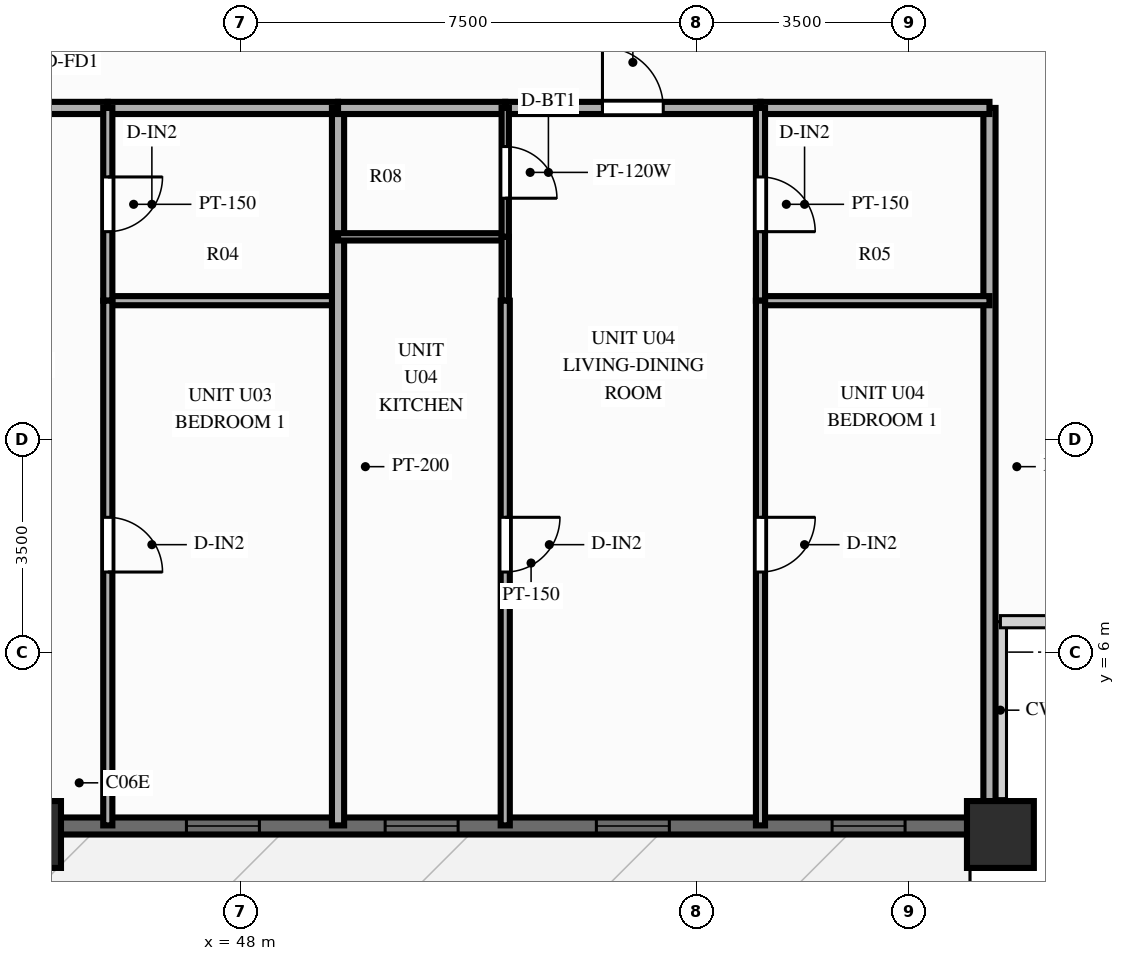
"""IFC4 building model, lengths in metres.
Left out: names, types, materials, properties, quantities, classifications, styles, units other than length and angle.
Written with IfcOpenShell. Run it as: python <this file> out.ifc"""

import sys

from ifc_helpers import new_model, si_unit, direction, frame, frame_2d, origin, origin_2d, place, context, subcontext, project, spatial, rectangle, extrude, source, transform, mapped, element, fill, save


model = new_model("IFC4")
c1 = context("Model", 3, precision=1e-05, world=origin(), true_north=direction((0.0, 1.0)))
c2 = subcontext(c1, "Body", "Model", "MODEL_VIEW")
j1 = project(units=[si_unit("LENGTHUNIT", "METRE"), si_unit("PLANEANGLEUNIT", "RADIAN")], contexts=[c1])
p1 = place(None, origin())
s1 = spatial("IfcSite", under=j1, at=p1, CompositionType="ELEMENT")
p2 = place(p1, origin())
s2 = spatial("IfcBuilding", under=s1, at=p2, CompositionType="ELEMENT")
p3 = place(p2, frame((0.0, 0.0, 34.4)))
s3 = spatial("IfcBuildingStorey", under=s2, at=p3, CompositionType="ELEMENT", Elevation=34.4)
m1 = source(origin(), c2, "Body", "SweptSolid", [
    extrude(rectangle(XDim=1.1, YDim=1.1, at=origin_2d()), origin(), (0.0, 0.0, 1.0), 3.0),
])
for number, where, z_axis, x_axis in (
    (1, (44.5, 3.0, 0.0), (0.0, 0.0, 1.0), (1.0, 0.0, 0.0)),
    (2, (60.5, 3.0, 0.0), (0.0, 0.0, 1.0), (1.0, 0.0, 0.0)),
):
    element("IfcColumn", number, at=place(p3, frame(where, z_axis=z_axis, x_axis=x_axis)), inside=s3, PredefinedType="COLUMN", context=c2, shape_type="MappedRepresentation", body=[
        mapped(m1, transform((0.0, 0.0, 0.0), scale=1.0)),
    ])
p4 = place(p3, frame((15.5, 3.14, 0.0), z_axis=(0.0, 0.0, 1.0), x_axis=(1.0, 0.0, 0.0)))
e3 = element("IfcWall", 3, at=p4, inside=s3, PredefinedType="SOLIDWALL", context=c2, shape_type="SweptSolid", body=[
    extrude(rectangle(XDim=45.0, YDim=0.28, at=frame_2d((22.5, 0.0))), origin(), (0.0, 0.0, 1.0), 2.28),
])
p5 = place(p4, frame((1.06, 0.0, 0.25)))
e4 = element("IfcOpeningElement", 4, at=p5, cuts=e3, PredefinedType="OPENING", context=c2, shape_type="SweptSolid", body=[
    extrude(rectangle(XDim=1.2, YDim=1.5, at=frame_2d((0.6, 0.75))), frame((0.0, 0.152, 0.0), z_axis=(0.0, -1.0, 0.0), x_axis=(1.0, 0.0, 0.0)), (0.0, 0.0, 1.0), 0.304),
])
p6 = place(p4, frame((4.875, 0.0, 0.25)))
e5 = element("IfcOpeningElement", 5, at=p6, cuts=e3, PredefinedType="OPENING", context=c2, shape_type="SweptSolid", body=[
    extrude(rectangle(XDim=1.2, YDim=1.5, at=frame_2d((0.6, 0.75))), frame((0.0, 0.152, 0.0), z_axis=(0.0, -1.0, 0.0), x_axis=(1.0, 0.0, 0.0)), (0.0, 0.0, 1.0), 0.304),
])
p7 = place(p4, frame((9.303, 0.0, 0.25)))
e6 = element("IfcOpeningElement", 6, at=p7, cuts=e3, PredefinedType="OPENING", context=c2, shape_type="SweptSolid", body=[
    extrude(rectangle(XDim=1.2, YDim=1.5, at=frame_2d((0.6, 0.75))), frame((0.0, 0.152, 0.0), z_axis=(0.0, -1.0, 0.0), x_axis=(1.0, 0.0, 0.0)), (0.0, 0.0, 1.0), 0.304),
])
p8 = place(p4, frame((13.098, 0.0, 0.25)))
e7 = element("IfcOpeningElement", 7, at=p8, cuts=e3, PredefinedType="OPENING", context=c2, shape_type="SweptSolid", body=[
    extrude(rectangle(XDim=1.2, YDim=1.5, at=frame_2d((0.6, 0.75))), frame((0.0, 0.152, 0.0), z_axis=(0.0, -1.0, 0.0), x_axis=(1.0, 0.0, 0.0)), (0.0, 0.0, 1.0), 0.304),
])
p9 = place(p4, frame((17.408, 0.0, 0.25)))
e8 = element("IfcOpeningElement", 8, at=p9, cuts=e3, PredefinedType="OPENING", context=c2, shape_type="SweptSolid", body=[
    extrude(rectangle(XDim=1.2, YDim=1.5, at=frame_2d((0.6, 0.75))), frame((0.0, 0.152, 0.0), z_axis=(0.0, -1.0, 0.0), x_axis=(1.0, 0.0, 0.0)), (0.0, 0.0, 1.0), 0.304),
])
p10 = place(p4, frame((22.06, 0.0, 0.0), z_axis=(0.0, 0.0, 1.0), x_axis=(-1.0, 0.0, 0.0)))
e9 = element("IfcOpeningElement", 9, at=p10, cuts=e3, PredefinedType="OPENING", context=c2, shape_type="SweptSolid", body=[
    extrude(rectangle(XDim=1.1, YDim=2.15, at=frame_2d((0.55, 1.075))), frame((0.0, 0.152, 0.0), z_axis=(0.0, -1.0, 0.0), x_axis=(1.0, 0.0, 0.0)), (0.0, 0.0, 1.0), 0.304),
])
p11 = place(p4, frame((24.168, 0.0, 0.25)))
e10 = element("IfcOpeningElement", 10, at=p11, cuts=e3, PredefinedType="OPENING", context=c2, shape_type="SweptSolid", body=[
    extrude(rectangle(XDim=1.2, YDim=1.5, at=frame_2d((0.6, 0.75))), frame((0.0, 0.152, 0.0), z_axis=(0.0, -1.0, 0.0), x_axis=(1.0, 0.0, 0.0)), (0.0, 0.0, 1.0), 0.304),
])
p12 = place(p4, frame((26.776, 0.0, 0.25)))
e11 = element("IfcOpeningElement", 11, at=p12, cuts=e3, PredefinedType="OPENING", context=c2, shape_type="SweptSolid", body=[
    extrude(rectangle(XDim=1.2, YDim=1.5, at=frame_2d((0.6, 0.75))), frame((0.0, 0.152, 0.0), z_axis=(0.0, -1.0, 0.0), x_axis=(1.0, 0.0, 0.0)), (0.0, 0.0, 1.0), 0.304),
])
p13 = place(p4, frame((31.613, 0.0, 0.25)))
e12 = element("IfcOpeningElement", 12, at=p13, cuts=e3, PredefinedType="OPENING", context=c2, shape_type="SweptSolid", body=[
    extrude(rectangle(XDim=1.2, YDim=1.5, at=frame_2d((0.6, 0.75))), frame((0.0, 0.152, 0.0), z_axis=(0.0, -1.0, 0.0), x_axis=(1.0, 0.0, 0.0)), (0.0, 0.0, 1.0), 0.304),
])
p14 = place(p4, frame((34.881, 0.0, 0.25)))
e13 = element("IfcOpeningElement", 13, at=p14, cuts=e3, PredefinedType="OPENING", context=c2, shape_type="SweptSolid", body=[
    extrude(rectangle(XDim=1.2, YDim=1.5, at=frame_2d((0.6, 0.75))), frame((0.0, 0.152, 0.0), z_axis=(0.0, -1.0, 0.0), x_axis=(1.0, 0.0, 0.0)), (0.0, 0.0, 1.0), 0.304),
])
p15 = place(p4, frame((38.355, 0.0, 0.25)))
e14 = element("IfcOpeningElement", 14, at=p15, cuts=e3, PredefinedType="OPENING", context=c2, shape_type="SweptSolid", body=[
    extrude(rectangle(XDim=1.2, YDim=1.5, at=frame_2d((0.6, 0.75))), frame((0.0, 0.152, 0.0), z_axis=(0.0, -1.0, 0.0), x_axis=(1.0, 0.0, 0.0)), (0.0, 0.0, 1.0), 0.304),
])
p16 = place(p4, frame((42.232, 0.0, 0.25)))
e15 = element("IfcOpeningElement", 15, at=p16, cuts=e3, PredefinedType="OPENING", context=c2, shape_type="SweptSolid", body=[
    extrude(rectangle(XDim=1.2, YDim=1.5, at=frame_2d((0.6, 0.75))), frame((0.0, 0.152, 0.0), z_axis=(0.0, -1.0, 0.0), x_axis=(1.0, 0.0, 0.0)), (0.0, 0.0, 1.0), 0.304),
])
p17 = place(p3, frame((60.32, 14.95, 0.0), z_axis=(0.0, 0.0, 1.0), x_axis=(0.0, -1.0, 0.0)))
e16 = element("IfcWall", 16, at=p17, inside=s3, PredefinedType="PARTITIONING", context=c2, shape_type="SweptSolid", body=[
    extrude(rectangle(XDim=11.8, YDim=0.2, at=frame_2d((5.9, 0.0))), origin(), (0.0, 0.0, 1.0), 2.79),
])
p18 = place(p3, frame((41.643, 14.95, 0.0), z_axis=(0.0, 0.0, 1.0), x_axis=(1.0, 0.0, 0.0)))
e17 = element("IfcWall", 17, at=p18, inside=s3, PredefinedType="PARTITIONING", context=c2, shape_type="SweptSolid", body=[
    extrude(rectangle(XDim=4.177, YDim=0.2, at=frame_2d((2.089, 0.0))), origin(), (0.0, 0.0, 1.0), 2.79),
])
p19 = place(p18, frame((1.589, 0.0, 0.0)))
e18 = element("IfcOpeningElement", 18, at=p19, cuts=e17, PredefinedType="OPENING", context=c2, shape_type="SweptSolid", body=[
    extrude(rectangle(XDim=1.0, YDim=2.15, at=frame_2d((0.5, 1.075))), frame((0.0, 0.112, 0.0), z_axis=(0.0, -1.0, 0.0), x_axis=(1.0, 0.0, 0.0)), (0.0, 0.0, 1.0), 0.224),
])
p20 = place(p3, frame((45.82, 14.95, 0.0), z_axis=(0.0, 0.0, 1.0), x_axis=(1.0, 0.0, 0.0)))
e19 = element("IfcWall", 19, at=p20, inside=s3, PredefinedType="PARTITIONING", context=c2, shape_type="SweptSolid", body=[
    extrude(rectangle(XDim=3.786, YDim=0.2, at=frame_2d((1.893, 0.0))), origin(), (0.0, 0.0, 1.0), 2.79),
])
p21 = place(p3, frame((45.82, 11.78, 0.0), z_axis=(0.0, 0.0, 1.0), x_axis=(1.0, 0.0, 0.0)))
e20 = element("IfcWall", 20, at=p21, inside=s3, PredefinedType="PARTITIONING", context=c2, shape_type="SweptSolid", body=[
    extrude(rectangle(XDim=3.786, YDim=0.15, at=frame_2d((1.893, 0.0))), origin(), (0.0, 0.0, 1.0), 2.79),
])
p22 = place(p3, frame((45.82, 14.95, 0.0), z_axis=(0.0, 0.0, 1.0), x_axis=(0.0, -1.0, 0.0)))
e21 = element("IfcWall", 21, at=p22, inside=s3, PredefinedType="PARTITIONING", context=c2, shape_type="SweptSolid", body=[
    extrude(rectangle(XDim=3.17, YDim=0.15, at=frame_2d((1.585, 0.0))), origin(), (0.0, 0.0, 1.0), 2.79),
])
p23 = place(p22, frame((1.135, 0.0, 0.0)))
e22 = element("IfcOpeningElement", 22, at=p23, cuts=e21, PredefinedType="OPENING", context=c2, shape_type="SweptSolid", body=[
    extrude(rectangle(XDim=0.9, YDim=2.1, at=frame_2d((0.45, 1.05))), frame((0.0, 0.087, 0.0), z_axis=(0.0, -1.0, 0.0), x_axis=(1.0, 0.0, 0.0)), (0.0, 0.0, 1.0), 0.174),
])
p24 = place(p3, frame((45.82, 11.78, 0.0), z_axis=(0.0, 0.0, 1.0), x_axis=(0.0, -1.0, 0.0)))
e23 = element("IfcWall", 23, at=p24, inside=s3, PredefinedType="PARTITIONING", context=c2, shape_type="SweptSolid", body=[
    extrude(rectangle(XDim=8.63, YDim=0.15, at=frame_2d((4.315, 0.0))), origin(), (0.0, 0.0, 1.0), 2.79),
])
p25 = place(p24, frame((3.563, 0.0, 0.0)))
e24 = element("IfcOpeningElement", 24, at=p25, cuts=e23, PredefinedType="OPENING", context=c2, shape_type="SweptSolid", body=[
    extrude(rectangle(XDim=0.9, YDim=2.1, at=frame_2d((0.45, 1.05))), frame((0.0, 0.087, 0.0), z_axis=(0.0, -1.0, 0.0), x_axis=(1.0, 0.0, 0.0)), (0.0, 0.0, 1.0), 0.174),
])
p26 = place(p3, frame((49.606, 14.95, 0.0), z_axis=(0.0, 0.0, 1.0), x_axis=(0.0, -1.0, 0.0)))
e25 = element("IfcWall", 25, at=p26, inside=s3, PredefinedType="PARTITIONING", context=c2, shape_type="SweptSolid", body=[
    extrude(rectangle(XDim=11.8, YDim=0.2, at=frame_2d((5.9, 0.0))), origin(), (0.0, 0.0, 1.0), 2.79),
])
p27 = place(p3, frame((49.606, 14.95, 0.0), z_axis=(0.0, 0.0, 1.0), x_axis=(1.0, 0.0, 0.0)))
e26 = element("IfcWall", 26, at=p27, inside=s3, PredefinedType="PARTITIONING", context=c2, shape_type="SweptSolid", body=[
    extrude(rectangle(XDim=2.75, YDim=0.2, at=frame_2d((1.375, 0.0))), origin(), (0.0, 0.0, 1.0), 2.79),
])
p28 = place(p3, frame((52.356, 14.95, 0.0), z_axis=(0.0, 0.0, 1.0), x_axis=(1.0, 0.0, 0.0)))
e27 = element("IfcWall", 27, at=p28, inside=s3, PredefinedType="PARTITIONING", context=c2, shape_type="SweptSolid", body=[
    extrude(rectangle(XDim=4.198, YDim=0.2, at=frame_2d((2.099, 0.0))), origin(), (0.0, 0.0, 1.0), 2.79),
])
p29 = place(p28, frame((1.599, 0.0, 0.0)))
e28 = element("IfcOpeningElement", 28, at=p29, cuts=e27, PredefinedType="OPENING", context=c2, shape_type="SweptSolid", body=[
    extrude(rectangle(XDim=1.0, YDim=2.15, at=frame_2d((0.5, 1.075))), frame((0.0, 0.112, 0.0), z_axis=(0.0, -1.0, 0.0), x_axis=(1.0, 0.0, 0.0)), (0.0, 0.0, 1.0), 0.224),
])
p30 = place(p3, frame((56.554, 14.95, 0.0), z_axis=(0.0, 0.0, 1.0), x_axis=(1.0, 0.0, 0.0)))
e29 = element("IfcWall", 29, at=p30, inside=s3, PredefinedType="PARTITIONING", context=c2, shape_type="SweptSolid", body=[
    extrude(rectangle(XDim=3.766, YDim=0.2, at=frame_2d((1.883, 0.0))), origin(), (0.0, 0.0, 1.0), 2.79),
])
p31 = place(p3, frame((49.606, 12.83, 0.0), z_axis=(0.0, 0.0, 1.0), x_axis=(1.0, 0.0, 0.0)))
e30 = element("IfcWall", 30, at=p31, inside=s3, PredefinedType="PARTITIONING", context=c2, shape_type="SweptSolid", body=[
    extrude(rectangle(XDim=2.75, YDim=0.12, at=frame_2d((1.375, 0.0))), origin(), (0.0, 0.0, 1.0), 2.79),
])
p32 = place(p3, frame((56.554, 11.78, 0.0), z_axis=(0.0, 0.0, 1.0), x_axis=(1.0, 0.0, 0.0)))
e31 = element("IfcWall", 31, at=p32, inside=s3, PredefinedType="PARTITIONING", context=c2, shape_type="SweptSolid", body=[
    extrude(rectangle(XDim=3.766, YDim=0.15, at=frame_2d((1.883, 0.0))), origin(), (0.0, 0.0, 1.0), 2.79),
])
p33 = place(p3, frame((52.356, 14.95, 0.0), z_axis=(0.0, 0.0, 1.0), x_axis=(0.0, -1.0, 0.0)))
e32 = element("IfcWall", 32, at=p33, inside=s3, PredefinedType="PARTITIONING", context=c2, shape_type="SweptSolid", body=[
    extrude(rectangle(XDim=2.12, YDim=0.12, at=frame_2d((1.06, 0.0))), origin(), (0.0, 0.0, 1.0), 2.79),
])
p34 = place(p33, frame((0.635, 0.0, 0.0)))
e33 = element("IfcOpeningElement", 33, at=p34, cuts=e32, PredefinedType="OPENING", context=c2, shape_type="SweptSolid", body=[
    extrude(rectangle(XDim=0.85, YDim=2.05, at=frame_2d((0.425, 1.025))), frame((0.0, 0.072, 0.0), z_axis=(0.0, -1.0, 0.0), x_axis=(1.0, 0.0, 0.0)), (0.0, 0.0, 1.0), 0.144),
])
p35 = place(p3, frame((52.356, 12.83, 0.0), z_axis=(0.0, 0.0, 1.0), x_axis=(0.0, -1.0, 0.0)))
e34 = element("IfcWall", 34, at=p35, inside=s3, PredefinedType="PARTITIONING", context=c2, shape_type="SweptSolid", body=[
    extrude(rectangle(XDim=1.05, YDim=0.12, at=frame_2d((0.525, 0.0))), origin(), (0.0, 0.0, 1.0), 2.79),
])
p36 = place(p3, frame((52.356, 11.78, 0.0), z_axis=(0.0, 0.0, 1.0), x_axis=(0.0, -1.0, 0.0)))
e35 = element("IfcWall", 35, at=p36, inside=s3, PredefinedType="PARTITIONING", context=c2, shape_type="SweptSolid", body=[
    extrude(rectangle(XDim=8.63, YDim=0.15, at=frame_2d((4.315, 0.0))), origin(), (0.0, 0.0, 1.0), 2.79),
])
p37 = place(p36, frame((3.563, 0.0, 0.0)))
e36 = element("IfcOpeningElement", 36, at=p37, cuts=e35, PredefinedType="OPENING", context=c2, shape_type="SweptSolid", body=[
    extrude(rectangle(XDim=0.9, YDim=2.1, at=frame_2d((0.45, 1.05))), frame((0.0, 0.087, 0.0), z_axis=(0.0, -1.0, 0.0), x_axis=(1.0, 0.0, 0.0)), (0.0, 0.0, 1.0), 0.174),
])
p38 = place(p3, frame((56.554, 14.95, 0.0), z_axis=(0.0, 0.0, 1.0), x_axis=(0.0, -1.0, 0.0)))
e37 = element("IfcWall", 37, at=p38, inside=s3, PredefinedType="PARTITIONING", context=c2, shape_type="SweptSolid", body=[
    extrude(rectangle(XDim=3.17, YDim=0.15, at=frame_2d((1.585, 0.0))), origin(), (0.0, 0.0, 1.0), 2.79),
])
p39 = place(p38, frame((1.135, 0.0, 0.0)))
e38 = element("IfcOpeningElement", 38, at=p39, cuts=e37, PredefinedType="OPENING", context=c2, shape_type="SweptSolid", body=[
    extrude(rectangle(XDim=0.9, YDim=2.1, at=frame_2d((0.45, 1.05))), frame((0.0, 0.087, 0.0), z_axis=(0.0, -1.0, 0.0), x_axis=(1.0, 0.0, 0.0)), (0.0, 0.0, 1.0), 0.174),
])
p40 = place(p3, frame((56.554, 11.78, 0.0), z_axis=(0.0, 0.0, 1.0), x_axis=(0.0, -1.0, 0.0)))
e39 = element("IfcWall", 39, at=p40, inside=s3, PredefinedType="PARTITIONING", context=c2, shape_type="SweptSolid", body=[
    extrude(rectangle(XDim=8.63, YDim=0.15, at=frame_2d((4.315, 0.0))), origin(), (0.0, 0.0, 1.0), 2.79),
])
p41 = place(p40, frame((3.563, 0.0, 0.0)))
e40 = element("IfcOpeningElement", 40, at=p41, cuts=e39, PredefinedType="OPENING", context=c2, shape_type="SweptSolid", body=[
    extrude(rectangle(XDim=0.9, YDim=2.1, at=frame_2d((0.45, 1.05))), frame((0.0, 0.087, 0.0), z_axis=(0.0, -1.0, 0.0), x_axis=(1.0, 0.0, 0.0)), (0.0, 0.0, 1.0), 0.174),
])
m2 = source(origin(), c2, "Body", "SweptSolid", [
    extrude(rectangle(XDim=1.2, YDim=1.5, at=frame_2d((0.6, 0.75))), frame((0.0, 0.03, 0.0), z_axis=(0.0, -1.0, 0.0), x_axis=(1.0, 0.0, 0.0)), (0.0, 0.0, 1.0), 0.06),
])
p42 = place(p13, origin())
e41 = element("IfcWindow", 41, at=p42, inside=s3, PartitioningType="SINGLE_PANEL", PredefinedType="WINDOW", context=c2, shape_type="MappedRepresentation", body=[
    mapped(m2, transform((0.0, 0.0, 0.0), scale=1.0)),
])
fill(e12, e41)
p43 = place(p14, origin())
e42 = element("IfcWindow", 42, at=p43, inside=s3, PartitioningType="SINGLE_PANEL", PredefinedType="WINDOW", context=c2, shape_type="MappedRepresentation", body=[
    mapped(m2, transform((0.0, 0.0, 0.0), scale=1.0)),
])
fill(e13, e42)
p44 = place(p15, origin())
e43 = element("IfcWindow", 43, at=p44, inside=s3, PartitioningType="SINGLE_PANEL", PredefinedType="WINDOW", context=c2, shape_type="MappedRepresentation", body=[
    mapped(m2, transform((0.0, 0.0, 0.0), scale=1.0)),
])
fill(e14, e43)
p45 = place(p16, origin())
e44 = element("IfcWindow", 44, at=p45, inside=s3, PartitioningType="SINGLE_PANEL", PredefinedType="WINDOW", context=c2, shape_type="MappedRepresentation", body=[
    mapped(m2, transform((0.0, 0.0, 0.0), scale=1.0)),
])
fill(e15, e44)
m3 = source(origin(), c2, "Body", "SweptSolid", [
    extrude(rectangle(XDim=0.9, YDim=2.1, at=frame_2d((0.45, 1.05))), frame((0.0, 0.025, 0.0), z_axis=(0.0, -1.0, 0.0), x_axis=(1.0, 0.0, 0.0)), (0.0, 0.0, 1.0), 0.05),
])
p46 = place(p23, origin())
e45 = element("IfcDoor", 45, at=p46, inside=s3, OperationType="SINGLE_SWING_LEFT", PredefinedType="DOOR", context=c2, shape_type="MappedRepresentation", body=[
    mapped(m3, transform((0.0, 0.0, 0.0), scale=1.0)),
])
fill(e22, e45)
p47 = place(p25, origin())
e46 = element("IfcDoor", 46, at=p47, inside=s3, OperationType="SINGLE_SWING_RIGHT", PredefinedType="DOOR", context=c2, shape_type="MappedRepresentation", body=[
    mapped(m3, transform((0.0, 0.0, 0.0), scale=1.0)),
])
fill(e24, e46)
m4 = source(origin(), c2, "Body", "SweptSolid", [
    extrude(rectangle(XDim=1.0, YDim=2.15, at=frame_2d((0.5, 1.075))), frame((0.0, 0.025, 0.0), z_axis=(0.0, -1.0, 0.0), x_axis=(1.0, 0.0, 0.0)), (0.0, 0.0, 1.0), 0.05),
])
p48 = place(p29, origin())
e47 = element("IfcDoor", 47, at=p48, inside=s3, OperationType="SINGLE_SWING_LEFT", PredefinedType="DOOR", context=c2, shape_type="MappedRepresentation", body=[
    mapped(m4, transform((0.0, 0.0, 0.0), scale=1.0)),
])
fill(e28, e47)
m5 = source(origin(), c2, "Body", "SweptSolid", [
    extrude(rectangle(XDim=0.85, YDim=2.05, at=frame_2d((0.425, 1.025))), frame((0.0, 0.025, 0.0), z_axis=(0.0, -1.0, 0.0), x_axis=(1.0, 0.0, 0.0)), (0.0, 0.0, 1.0), 0.05),
])
p49 = place(p34, origin())
e48 = element("IfcDoor", 48, at=p49, inside=s3, OperationType="SINGLE_SWING_RIGHT", PredefinedType="DOOR", context=c2, shape_type="MappedRepresentation", body=[
    mapped(m5, transform((0.0, 0.0, 0.0), scale=1.0)),
])
fill(e33, e48)
p50 = place(p37, origin())
e49 = element("IfcDoor", 49, at=p50, inside=s3, OperationType="SINGLE_SWING_LEFT", PredefinedType="DOOR", context=c2, shape_type="MappedRepresentation", body=[
    mapped(m3, transform((0.0, 0.0, 0.0), scale=1.0)),
])
fill(e36, e49)
p51 = place(p39, origin())
e50 = element("IfcDoor", 50, at=p51, inside=s3, OperationType="SINGLE_SWING_RIGHT", PredefinedType="DOOR", context=c2, shape_type="MappedRepresentation", body=[
    mapped(m3, transform((0.0, 0.0, 0.0), scale=1.0)),
])
fill(e38, e50)
p52 = place(p41, origin())
e51 = element("IfcDoor", 51, at=p52, inside=s3, OperationType="SINGLE_SWING_LEFT", PredefinedType="DOOR", context=c2, shape_type="MappedRepresentation", body=[
    mapped(m3, transform((0.0, 0.0, 0.0), scale=1.0)),
])
fill(e40, e51)
save(model, sys.argv[1])
